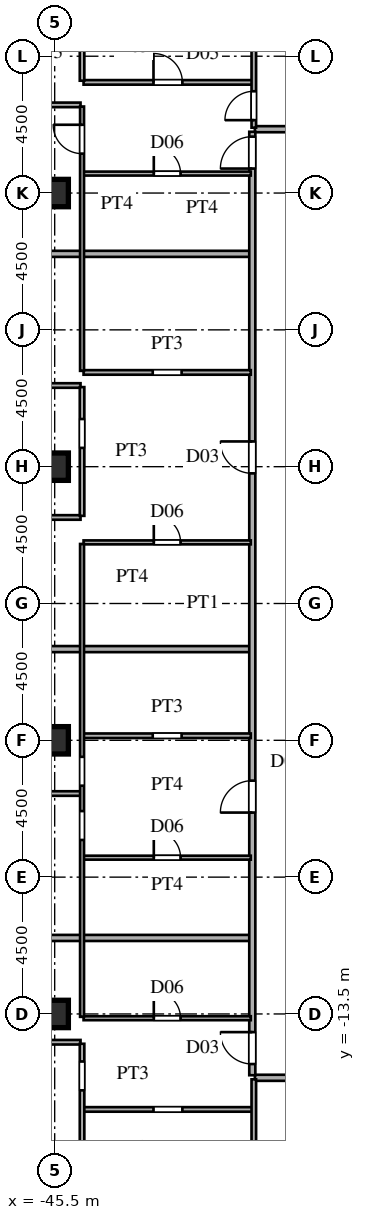
"""IFC4 building model, lengths in metres.
Left out: names, types, materials, properties, quantities, classifications, styles, units other than length and angle.
Written with IfcOpenShell. Run it as: python <this file> out.ifc"""

import sys

from ifc_helpers import new_model, si_unit, direction, frame, frame_2d, origin, origin_2d, place, context, subcontext, project, spatial, rectangle, i_section, extrude, source, transform, mapped, element, fill, save


model = new_model("IFC4")
c1 = context("Model", 3, precision=1e-05, world=origin(), true_north=direction((0.0, 1.0)))
c2 = subcontext(c1, "Body", "Model", "MODEL_VIEW")
j1 = project(units=[si_unit("LENGTHUNIT", "METRE"), si_unit("PLANEANGLEUNIT", "RADIAN")], contexts=[c1])
p1 = place(None, origin())
s1 = spatial("IfcSite", under=j1, at=p1, CompositionType="ELEMENT")
p2 = place(p1, origin())
s2 = spatial("IfcBuilding", under=s1, at=p2, CompositionType="ELEMENT")
p3 = place(p2, frame((0.0, 0.0, 40.5)))
s3 = spatial("IfcBuildingStorey", under=s2, at=p3, CompositionType="ELEMENT", Elevation=40.5)
m1 = source(origin(), c2, "Body", "SweptSolid", [
    extrude(i_section(OverallWidth=0.9, OverallDepth=0.9, WebThickness=0.036, FlangeThickness=0.055, at=origin_2d()), origin(), (0.0, 0.0, 1.0), 3.6),
])
for number, where, z_axis, x_axis in (
    (1, (-45.5, -13.5, 0.0), (0.0, 0.0, 1.0), (1.0, 0.0, 0.0)),
    (2, (-45.5, -4.5, 0.0), (0.0, 0.0, 1.0), (1.0, 0.0, 0.0)),
    (3, (-45.5, 4.5, 0.0), (0.0, 0.0, 1.0), (1.0, 0.0, 0.0)),
    (4, (-45.5, 13.5, 0.0), (0.0, 0.0, 1.0), (1.0, 0.0, 0.0)),
):
    element("IfcColumn", number, at=place(p3, frame(where, z_axis=z_axis, x_axis=x_axis)), inside=s3, PredefinedType="COLUMN", context=c2, shape_type="MappedRepresentation", body=[
        mapped(m1, transform((0.0, 0.0, 0.0), scale=1.0)),
    ])
p4 = place(p3, frame((-44.55, -16.64, 0.0), z_axis=(0.0, 0.0, 1.0), x_axis=(1.0, 0.0, 0.0)))
e5 = element("IfcWall", 5, at=p4, inside=s3, PredefinedType="PARTITIONING", context=c2, shape_type="SweptSolid", body=[
    extrude(rectangle(XDim=5.55, YDim=0.15, at=frame_2d((2.775, 0.0))), origin(), (0.0, 0.0, 1.0), 3.38),
])
p5 = place(p4, frame((2.3, 0.0, 0.0)))
e6 = element("IfcOpeningElement", 6, at=p5, cuts=e5, PredefinedType="OPENING", context=c2, shape_type="SweptSolid", body=[
    extrude(rectangle(XDim=0.95, YDim=2.15, at=frame_2d((0.475, 1.075))), frame((0.0, 0.085, 0.0), z_axis=(0.0, -1.0, 0.0), x_axis=(1.0, 0.0, 0.0)), (0.0, 0.0, 1.0), 0.17),
])
p6 = place(p3, frame((-38.915, -15.6, 0.0), z_axis=(0.0, 0.0, 1.0), x_axis=(1.0, 0.0, 0.0)))
e7 = element("IfcWall", 7, at=p6, inside=s3, PredefinedType="PARTITIONING", context=c2, shape_type="SweptSolid", body=[
    extrude(rectangle(XDim=2.33, YDim=0.2, at=frame_2d((1.165, 0.0))), origin(), (0.0, 0.0, 1.0), 3.38),
])
p7 = place(p3, frame((-61.588, -14.43, 0.0), z_axis=(0.0, 0.0, 1.0), x_axis=(1.0, 0.0, 0.0)))
e8 = element("IfcWall", 8, at=p7, inside=s3, PredefinedType="PARTITIONING", context=c2, shape_type="SweptSolid", body=[
    extrude(rectangle(XDim=16.938, YDim=0.15, at=frame_2d((8.469, 0.0))), origin(), (0.0, 0.0, 1.0), 3.38),
])
p8 = place(p7, frame((11.563, 0.0, 0.0)))
e9 = element("IfcOpeningElement", 9, at=p8, cuts=e8, PredefinedType="OPENING", context=c2, shape_type="SweptSolid", body=[
    extrude(rectangle(XDim=0.95, YDim=2.15, at=frame_2d((0.475, 1.075))), frame((0.0, 0.085, 0.0), z_axis=(0.0, -1.0, 0.0), x_axis=(1.0, 0.0, 0.0)), (0.0, 0.0, 1.0), 0.17),
])
p9 = place(p3, frame((-44.55, -13.64, 0.0), z_axis=(0.0, 0.0, 1.0), x_axis=(1.0, 0.0, 0.0)))
e10 = element("IfcWall", 10, at=p9, inside=s3, PredefinedType="PARTITIONING", context=c2, shape_type="SweptSolid", body=[
    extrude(rectangle(XDim=5.5, YDim=0.13, at=frame_2d((2.75, 0.0))), origin(), (0.0, 0.0, 1.0), 2.68),
])
p10 = place(p9, frame((2.31, 0.0, 0.0)))
e11 = element("IfcOpeningElement", 11, at=p10, cuts=e10, PredefinedType="OPENING", context=c2, shape_type="SweptSolid", body=[
    extrude(rectangle(XDim=0.88, YDim=2.1, at=frame_2d((0.44, 1.05))), frame((0.0, 0.075, 0.0), z_axis=(0.0, -1.0, 0.0), x_axis=(1.0, 0.0, 0.0)), (0.0, 0.0, 1.0), 0.15),
])
p11 = place(p3, frame((-70.043, -11.0, 0.0), z_axis=(0.0, 0.0, 1.0), x_axis=(1.0, 0.0, 0.0)))
e12 = element("IfcWall", 12, at=p11, inside=s3, PredefinedType="PARTITIONING", context=c2, shape_type="SweptSolid", body=[
    extrude(rectangle(XDim=30.963, YDim=0.2, at=frame_2d((15.481, 0.0))), origin(), (0.0, 0.0, 1.0), 3.38),
])
p12 = place(p3, frame((-44.55, -8.36, 0.0), z_axis=(0.0, 0.0, 1.0), x_axis=(1.0, 0.0, 0.0)))
e13 = element("IfcWall", 13, at=p12, inside=s3, PredefinedType="PARTITIONING", context=c2, shape_type="SweptSolid", body=[
    extrude(rectangle(XDim=5.5, YDim=0.13, at=frame_2d((2.75, 0.0))), origin(), (0.0, 0.0, 1.0), 3.38),
])
p13 = place(p12, frame((2.31, 0.0, 0.0)))
e14 = element("IfcOpeningElement", 14, at=p13, cuts=e13, PredefinedType="OPENING", context=c2, shape_type="SweptSolid", body=[
    extrude(rectangle(XDim=0.88, YDim=2.1, at=frame_2d((0.44, 1.05))), frame((0.0, 0.075, 0.0), z_axis=(0.0, -1.0, 0.0), x_axis=(1.0, 0.0, 0.0)), (0.0, 0.0, 1.0), 0.15),
])
p14 = place(p3, frame((-72.535, -6.25, 0.0), z_axis=(0.0, 0.0, 1.0), x_axis=(1.0, 0.0, 0.0)))
e15 = element("IfcWall", 15, at=p14, inside=s3, PredefinedType="PARTITIONING", context=c2, shape_type="SweptSolid", body=[
    extrude(rectangle(XDim=27.885, YDim=0.15, at=frame_2d((13.942, 0.0))), origin(), (0.0, 0.0, 1.0), 3.38),
])
p15 = place(p14, frame((14.71, 0.0, 0.0)))
e16 = element("IfcOpeningElement", 16, at=p15, cuts=e15, PredefinedType="OPENING", context=c2, shape_type="SweptSolid", body=[
    extrude(rectangle(XDim=0.95, YDim=2.15, at=frame_2d((0.475, 1.075))), frame((0.0, 0.085, 0.0), z_axis=(0.0, -1.0, 0.0), x_axis=(1.0, 0.0, 0.0)), (0.0, 0.0, 1.0), 0.17),
])
p16 = place(p3, frame((-44.55, -4.35, 0.0), z_axis=(0.0, 0.0, 1.0), x_axis=(1.0, 0.0, 0.0)))
e17 = element("IfcWall", 17, at=p16, inside=s3, PredefinedType="PARTITIONING", context=c2, shape_type="SweptSolid", body=[
    extrude(rectangle(XDim=5.5, YDim=0.15, at=frame_2d((2.75, 0.0))), origin(), (0.0, 0.0, 1.0), 2.68),
])
p17 = place(p16, frame((2.275, 0.0, 0.0)))
e18 = element("IfcOpeningElement", 18, at=p17, cuts=e17, PredefinedType="OPENING", context=c2, shape_type="SweptSolid", body=[
    extrude(rectangle(XDim=0.95, YDim=2.15, at=frame_2d((0.475, 1.075))), frame((0.0, 0.085, 0.0), z_axis=(0.0, -1.0, 0.0), x_axis=(1.0, 0.0, 0.0)), (0.0, 0.0, 1.0), 0.17),
])
p18 = place(p3, frame((-72.505, -1.5, 0.0), z_axis=(0.0, 0.0, 1.0), x_axis=(1.0, 0.0, 0.0)))
e19 = element("IfcWall", 19, at=p18, inside=s3, PredefinedType="PARTITIONING", context=c2, shape_type="SweptSolid", body=[
    extrude(rectangle(XDim=33.425, YDim=0.2, at=frame_2d((16.712, 0.0))), origin(), (0.0, 0.0, 1.0), 3.38),
])
p19 = place(p3, frame((-44.55, 2.01, 0.0), z_axis=(0.0, 0.0, 1.0), x_axis=(1.0, 0.0, 0.0)))
e20 = element("IfcWall", 20, at=p19, inside=s3, PredefinedType="PARTITIONING", context=c2, shape_type="SweptSolid", body=[
    extrude(rectangle(XDim=5.5, YDim=0.13, at=frame_2d((2.75, 0.0))), origin(), (0.0, 0.0, 1.0), 3.38),
])
p20 = place(p19, frame((2.31, 0.0, 0.0)))
e21 = element("IfcOpeningElement", 21, at=p20, cuts=e20, PredefinedType="OPENING", context=c2, shape_type="SweptSolid", body=[
    extrude(rectangle(XDim=0.88, YDim=2.1, at=frame_2d((0.44, 1.05))), frame((0.0, 0.075, 0.0), z_axis=(0.0, -1.0, 0.0), x_axis=(1.0, 0.0, 0.0)), (0.0, 0.0, 1.0), 0.15),
])
p21 = place(p3, frame((-72.535, 2.83, 0.0), z_axis=(0.0, 0.0, 1.0), x_axis=(1.0, 0.0, 0.0)))
e22 = element("IfcWall", 22, at=p21, inside=s3, PredefinedType="PARTITIONING", context=c2, shape_type="SweptSolid", body=[
    extrude(rectangle(XDim=27.885, YDim=0.15, at=frame_2d((13.942, 0.0))), origin(), (0.0, 0.0, 1.0), 3.38),
])
p22 = place(p21, frame((22.51, 0.0, 0.0)))
e23 = element("IfcOpeningElement", 23, at=p22, cuts=e22, PredefinedType="OPENING", context=c2, shape_type="SweptSolid", body=[
    extrude(rectangle(XDim=0.95, YDim=2.15, at=frame_2d((0.475, 1.075))), frame((0.0, 0.085, 0.0), z_axis=(0.0, -1.0, 0.0), x_axis=(1.0, 0.0, 0.0)), (0.0, 0.0, 1.0), 0.17),
])
p23 = place(p21, frame((14.71, 0.0, 0.0)))
e24 = element("IfcOpeningElement", 24, at=p23, cuts=e22, PredefinedType="OPENING", context=c2, shape_type="SweptSolid", body=[
    extrude(rectangle(XDim=0.95, YDim=2.15, at=frame_2d((0.475, 1.075))), frame((0.0, 0.085, 0.0), z_axis=(0.0, -1.0, 0.0), x_axis=(1.0, 0.0, 0.0)), (0.0, 0.0, 1.0), 0.17),
])
p24 = place(p3, frame((-72.535, 7.17, 0.0), z_axis=(0.0, 0.0, 1.0), x_axis=(1.0, 0.0, 0.0)))
e25 = element("IfcWall", 25, at=p24, inside=s3, PredefinedType="PARTITIONING", context=c2, shape_type="SweptSolid", body=[
    extrude(rectangle(XDim=27.885, YDim=0.15, at=frame_2d((13.942, 0.0))), origin(), (0.0, 0.0, 1.0), 3.38),
])
p25 = place(p24, frame((22.51, 0.0, 0.0)))
e26 = element("IfcOpeningElement", 26, at=p25, cuts=e25, PredefinedType="OPENING", context=c2, shape_type="SweptSolid", body=[
    extrude(rectangle(XDim=0.95, YDim=2.15, at=frame_2d((0.475, 1.075))), frame((0.0, 0.085, 0.0), z_axis=(0.0, -1.0, 0.0), x_axis=(1.0, 0.0, 0.0)), (0.0, 0.0, 1.0), 0.17),
])
p26 = place(p24, frame((14.71, 0.0, 0.0)))
e27 = element("IfcOpeningElement", 27, at=p26, cuts=e25, PredefinedType="OPENING", context=c2, shape_type="SweptSolid", body=[
    extrude(rectangle(XDim=0.95, YDim=2.15, at=frame_2d((0.475, 1.075))), frame((0.0, 0.085, 0.0), z_axis=(0.0, -1.0, 0.0), x_axis=(1.0, 0.0, 0.0)), (0.0, 0.0, 1.0), 0.17),
])
p27 = place(p3, frame((-44.55, 7.6, 0.0), z_axis=(0.0, 0.0, 1.0), x_axis=(1.0, 0.0, 0.0)))
e28 = element("IfcWall", 28, at=p27, inside=s3, PredefinedType="PARTITIONING", context=c2, shape_type="SweptSolid", body=[
    extrude(rectangle(XDim=5.5, YDim=0.15, at=frame_2d((2.75, 0.0))), origin(), (0.0, 0.0, 1.0), 3.38),
])
p28 = place(p27, frame((2.275, 0.0, 0.0)))
e29 = element("IfcOpeningElement", 29, at=p28, cuts=e28, PredefinedType="OPENING", context=c2, shape_type="SweptSolid", body=[
    extrude(rectangle(XDim=0.95, YDim=2.15, at=frame_2d((0.475, 1.075))), frame((0.0, 0.085, 0.0), z_axis=(0.0, -1.0, 0.0), x_axis=(1.0, 0.0, 0.0)), (0.0, 0.0, 1.0), 0.17),
])
p29 = place(p3, frame((-68.807, 11.5, 0.0), z_axis=(0.0, 0.0, 1.0), x_axis=(1.0, 0.0, 0.0)))
e30 = element("IfcWall", 30, at=p29, inside=s3, PredefinedType="PARTITIONING", context=c2, shape_type="SweptSolid", body=[
    extrude(rectangle(XDim=29.727, YDim=0.2, at=frame_2d((14.863, 0.0))), origin(), (0.0, 0.0, 1.0), 3.38),
])
p30 = place(p3, frame((-44.55, 14.14, 0.0), z_axis=(0.0, 0.0, 1.0), x_axis=(1.0, 0.0, 0.0)))
e31 = element("IfcWall", 31, at=p30, inside=s3, PredefinedType="PARTITIONING", context=c2, shape_type="SweptSolid", body=[
    extrude(rectangle(XDim=5.5, YDim=0.13, at=frame_2d((2.75, 0.0))), origin(), (0.0, 0.0, 1.0), 3.38),
])
p31 = place(p30, frame((2.31, 0.0, 0.0)))
e32 = element("IfcOpeningElement", 32, at=p31, cuts=e31, PredefinedType="OPENING", context=c2, shape_type="SweptSolid", body=[
    extrude(rectangle(XDim=0.88, YDim=2.1, at=frame_2d((0.44, 1.05))), frame((0.0, 0.075, 0.0), z_axis=(0.0, -1.0, 0.0), x_axis=(1.0, 0.0, 0.0)), (0.0, 0.0, 1.0), 0.15),
])
p32 = place(p3, frame((-38.915, 15.6, 0.0), z_axis=(0.0, 0.0, 1.0), x_axis=(1.0, 0.0, 0.0)))
e33 = element("IfcWall", 33, at=p32, inside=s3, PredefinedType="PARTITIONING", context=c2, shape_type="SweptSolid", body=[
    extrude(rectangle(XDim=2.33, YDim=0.2, at=frame_2d((1.165, 0.0))), origin(), (0.0, 0.0, 1.0), 3.38),
])
p33 = place(p3, frame((-54.45, 16.4, 0.0), z_axis=(0.0, 0.0, 1.0), x_axis=(1.0, 0.0, 0.0)))
e34 = element("IfcWall", 34, at=p33, inside=s3, PredefinedType="PARTITIONING", context=c2, shape_type="SweptSolid", body=[
    extrude(rectangle(XDim=9.8, YDim=0.15, at=frame_2d((4.9, 0.0))), origin(), (0.0, 0.0, 1.0), 3.38),
])
p34 = place(p33, frame((4.425, 0.0, 0.0)))
e35 = element("IfcOpeningElement", 35, at=p34, cuts=e34, PredefinedType="OPENING", context=c2, shape_type="SweptSolid", body=[
    extrude(rectangle(XDim=0.95, YDim=2.15, at=frame_2d((0.475, 1.075))), frame((0.0, 0.085, 0.0), z_axis=(0.0, -1.0, 0.0), x_axis=(1.0, 0.0, 0.0)), (0.0, 0.0, 1.0), 0.17),
])
p35 = place(p3, frame((-44.55, 17.14, 0.0), z_axis=(0.0, 0.0, 1.0), x_axis=(1.0, 0.0, 0.0)))
e36 = element("IfcWall", 36, at=p35, inside=s3, PredefinedType="PARTITIONING", context=c2, shape_type="SweptSolid", body=[
    extrude(rectangle(XDim=5.55, YDim=0.15, at=frame_2d((2.775, 0.0))), origin(), (0.0, 0.0, 1.0), 3.38),
])
p36 = place(p35, frame((2.3, 0.0, 0.0)))
e37 = element("IfcOpeningElement", 37, at=p36, cuts=e36, PredefinedType="OPENING", context=c2, shape_type="SweptSolid", body=[
    extrude(rectangle(XDim=0.95, YDim=2.15, at=frame_2d((0.475, 1.075))), frame((0.0, 0.085, 0.0), z_axis=(0.0, -1.0, 0.0), x_axis=(1.0, 0.0, 0.0)), (0.0, 0.0, 1.0), 0.17),
])
p37 = place(p3, frame((-44.6, -21.328, 0.0), z_axis=(0.0, 0.0, 1.0), x_axis=(0.0, 1.0, 0.0)))
e38 = element("IfcWall", 38, at=p37, inside=s3, PredefinedType="PARTITIONING", context=c2, shape_type="SweptSolid", body=[
    extrude(rectangle(XDim=6.847, YDim=0.15, at=frame_2d((3.423, 0.0))), origin(), (0.0, 0.0, 1.0), 3.38),
])
p38 = place(p37, frame((5.315, 0.0, 0.0)))
e39 = element("IfcOpeningElement", 39, at=p38, cuts=e38, PredefinedType="OPENING", context=c2, shape_type="SweptSolid", body=[
    extrude(rectangle(XDim=0.95, YDim=2.15, at=frame_2d((0.475, 1.075))), frame((0.0, 0.085, 0.0), z_axis=(0.0, -1.0, 0.0), x_axis=(1.0, 0.0, 0.0)), (0.0, 0.0, 1.0), 0.17),
])
p39 = place(p3, frame((-44.6, -13.595, 0.0), z_axis=(0.0, 0.0, 1.0), x_axis=(0.0, 1.0, 0.0)))
e40 = element("IfcWall", 40, at=p39, inside=s3, PredefinedType="PARTITIONING", context=c2, shape_type="SweptSolid", body=[
    extrude(rectangle(XDim=15.553, YDim=0.13, at=frame_2d((7.776, 0.0))), origin(), (0.0, 0.0, 1.0), 3.38),
])
p40 = place(p39, frame((5.817, 0.0, 0.0)))
e41 = element("IfcOpeningElement", 41, at=p40, cuts=e40, PredefinedType="OPENING", context=c2, shape_type="SweptSolid", body=[
    extrude(rectangle(XDim=0.95, YDim=2.15, at=frame_2d((0.475, 1.075))), frame((0.0, 0.075, 0.0), z_axis=(0.0, -1.0, 0.0), x_axis=(1.0, 0.0, 0.0)), (0.0, 0.0, 1.0), 0.15),
])
p41 = place(p39, frame((7.602, 0.0, 0.0)))
e42 = element("IfcOpeningElement", 42, at=p41, cuts=e40, PredefinedType="OPENING", context=c2, shape_type="SweptSolid", body=[
    extrude(rectangle(XDim=0.95, YDim=2.15, at=frame_2d((0.475, 1.075))), frame((0.0, 0.075, 0.0), z_axis=(0.0, -1.0, 0.0), x_axis=(1.0, 0.0, 0.0)), (0.0, 0.0, 1.0), 0.15),
])
p42 = place(p3, frame((-44.6, 2.883, 0.0), z_axis=(0.0, 0.0, 1.0), x_axis=(0.0, 1.0, 0.0)))
e43 = element("IfcWall", 43, at=p42, inside=s3, PredefinedType="PARTITIONING", context=c2, shape_type="SweptSolid", body=[
    extrude(rectangle(XDim=4.234, YDim=0.15, at=frame_2d((2.117, 0.0))), origin(), (0.0, 0.0, 1.0), 3.38),
])
p43 = place(p42, frame((2.235, 0.0, 0.0)))
e44 = element("IfcOpeningElement", 44, at=p43, cuts=e43, PredefinedType="OPENING", context=c2, shape_type="SweptSolid", body=[
    extrude(rectangle(XDim=0.95, YDim=2.15, at=frame_2d((0.475, 1.075))), frame((0.0, 0.085, 0.0), z_axis=(0.0, -1.0, 0.0), x_axis=(1.0, 0.0, 0.0)), (0.0, 0.0, 1.0), 0.17),
])
p44 = place(p3, frame((-44.6, 7.652, 0.0), z_axis=(0.0, 0.0, 1.0), x_axis=(0.0, 1.0, 0.0)))
e45 = element("IfcWall", 45, at=p44, inside=s3, PredefinedType="PARTITIONING", context=c2, shape_type="SweptSolid", body=[
    extrude(rectangle(XDim=8.694, YDim=0.13, at=frame_2d((4.347, 0.0))), origin(), (0.0, 0.0, 1.0), 3.38),
])
p45 = place(p44, frame((7.144, 0.0, 0.0)))
e46 = element("IfcOpeningElement", 46, at=p45, cuts=e45, PredefinedType="OPENING", context=c2, shape_type="SweptSolid", body=[
    extrude(rectangle(XDim=0.95, YDim=2.15, at=frame_2d((0.475, 1.075))), frame((0.0, 0.075, 0.0), z_axis=(0.0, -1.0, 0.0), x_axis=(1.0, 0.0, 0.0)), (0.0, 0.0, 1.0), 0.15),
])
p46 = place(p3, frame((-44.6, 17.195, 0.0), z_axis=(0.0, 0.0, 1.0), x_axis=(0.0, 1.0, 0.0)))
e47 = element("IfcWall", 47, at=p46, inside=s3, PredefinedType="PARTITIONING", context=c2, shape_type="SweptSolid", body=[
    extrude(rectangle(XDim=4.133, YDim=0.15, at=frame_2d((2.066, 0.0))), origin(), (0.0, 0.0, 1.0), 3.38),
])
p47 = place(p3, frame((-39.0, -15.515, 0.0), z_axis=(0.0, 0.0, 1.0), x_axis=(0.0, 1.0, 0.0)))
e48 = element("IfcWall", 48, at=p47, inside=s3, PredefinedType="PARTITIONING", context=c2, shape_type="SweptSolid", body=[
    extrude(rectangle(XDim=31.03, YDim=0.2, at=frame_2d((15.515, 0.0))), origin(), (0.0, 0.0, 1.0), 3.38),
])
p48 = place(p47, frame((0.367, 0.0, 0.0)))
e49 = element("IfcOpeningElement", 49, at=p48, cuts=e48, PredefinedType="OPENING", context=c2, shape_type="SweptSolid", body=[
    extrude(rectangle(XDim=1.05, YDim=2.25, at=frame_2d((0.525, 1.125))), frame((0.0, 0.11, 0.0), z_axis=(0.0, -1.0, 0.0), x_axis=(1.0, 0.0, 0.0)), (0.0, 0.0, 1.0), 0.22),
])
p49 = place(p47, frame((8.638, 0.0, 0.0)))
e50 = element("IfcOpeningElement", 50, at=p49, cuts=e48, PredefinedType="OPENING", context=c2, shape_type="SweptSolid", body=[
    extrude(rectangle(XDim=1.05, YDim=2.25, at=frame_2d((0.525, 1.125))), frame((0.0, 0.11, 0.0), z_axis=(0.0, -1.0, 0.0), x_axis=(1.0, 0.0, 0.0)), (0.0, 0.0, 1.0), 0.22),
])
p50 = place(p47, frame((19.795, 0.0, 0.0)))
e51 = element("IfcOpeningElement", 51, at=p50, cuts=e48, PredefinedType="OPENING", context=c2, shape_type="SweptSolid", body=[
    extrude(rectangle(XDim=1.05, YDim=2.25, at=frame_2d((0.525, 1.125))), frame((0.0, 0.11, 0.0), z_axis=(0.0, -1.0, 0.0), x_axis=(1.0, 0.0, 0.0)), (0.0, 0.0, 1.0), 0.22),
])
p51 = place(p47, frame((29.82, 0.0, 0.0)))
e52 = element("IfcOpeningElement", 52, at=p51, cuts=e48, PredefinedType="OPENING", context=c2, shape_type="SweptSolid", body=[
    extrude(rectangle(XDim=1.05, YDim=2.25, at=frame_2d((0.525, 1.125))), frame((0.0, 0.11, 0.0), z_axis=(0.0, -1.0, 0.0), x_axis=(1.0, 0.0, 0.0)), (0.0, 0.0, 1.0), 0.22),
])
p52 = place(p3, frame((-38.95, -23.615, 0.0), z_axis=(0.0, 0.0, 1.0), x_axis=(0.0, 1.0, 0.0)))
e53 = element("IfcWall", 53, at=p52, inside=s3, PredefinedType="PARTITIONING", context=c2, shape_type="SweptSolid", body=[
    extrude(rectangle(XDim=7.965, YDim=0.15, at=frame_2d((3.982, 0.0))), origin(), (0.0, 0.0, 1.0), 3.38),
])
p53 = place(p52, frame((1.225, 0.0, 0.0)))
e54 = element("IfcOpeningElement", 54, at=p53, cuts=e53, PredefinedType="OPENING", context=c2, shape_type="SweptSolid", body=[
    extrude(rectangle(XDim=0.95, YDim=2.15, at=frame_2d((0.475, 1.075))), frame((0.0, 0.085, 0.0), z_axis=(0.0, -1.0, 0.0), x_axis=(1.0, 0.0, 0.0)), (0.0, 0.0, 1.0), 0.17),
])
p54 = place(p3, frame((-38.95, 15.65, 0.0), z_axis=(0.0, 0.0, 1.0), x_axis=(0.0, 1.0, 0.0)))
e55 = element("IfcWall", 55, at=p54, inside=s3, PredefinedType="PARTITIONING", context=c2, shape_type="SweptSolid", body=[
    extrude(rectangle(XDim=7.965, YDim=0.15, at=frame_2d((3.982, 0.0))), origin(), (0.0, 0.0, 1.0), 3.38),
])
p55 = place(p54, frame((0.248, 0.0, 0.0)))
e56 = element("IfcOpeningElement", 56, at=p55, cuts=e55, PredefinedType="OPENING", context=c2, shape_type="SweptSolid", body=[
    extrude(rectangle(XDim=0.95, YDim=2.15, at=frame_2d((0.475, 1.075))), frame((0.0, 0.085, 0.0), z_axis=(0.0, -1.0, 0.0), x_axis=(1.0, 0.0, 0.0)), (0.0, 0.0, 1.0), 0.17),
])
m2 = source(origin(), c2, "Body", "SweptSolid", [
    extrude(rectangle(XDim=0.88, YDim=2.1, at=frame_2d((0.44, 1.05))), frame((0.0, 0.025, 0.0), z_axis=(0.0, -1.0, 0.0), x_axis=(1.0, 0.0, 0.0)), (0.0, 0.0, 1.0), 0.05),
])
p56 = place(p10, origin())
e57 = element("IfcDoor", 57, at=p56, inside=s3, OperationType="SINGLE_SWING_LEFT", PredefinedType="DOOR", context=c2, shape_type="MappedRepresentation", body=[
    mapped(m2, transform((0.0, 0.0, 0.0), scale=1.0)),
])
fill(e11, e57)
p57 = place(p13, origin())
e58 = element("IfcDoor", 58, at=p57, inside=s3, OperationType="SINGLE_SWING_LEFT", PredefinedType="DOOR", context=c2, shape_type="MappedRepresentation", body=[
    mapped(m2, transform((0.0, 0.0, 0.0), scale=1.0)),
])
fill(e14, e58)
p58 = place(p20, origin())
e59 = element("IfcDoor", 59, at=p58, inside=s3, OperationType="SINGLE_SWING_LEFT", PredefinedType="DOOR", context=c2, shape_type="MappedRepresentation", body=[
    mapped(m2, transform((0.0, 0.0, 0.0), scale=1.0)),
])
fill(e21, e59)
p59 = place(p31, origin())
e60 = element("IfcDoor", 60, at=p59, inside=s3, OperationType="SINGLE_SWING_LEFT", PredefinedType="DOOR", context=c2, shape_type="MappedRepresentation", body=[
    mapped(m2, transform((0.0, 0.0, 0.0), scale=1.0)),
])
fill(e32, e60)
m3 = source(origin(), c2, "Body", "SweptSolid", [
    extrude(rectangle(XDim=0.95, YDim=2.15, at=frame_2d((0.475, 1.075))), frame((0.0, 0.025, 0.0), z_axis=(0.0, -1.0, 0.0), x_axis=(1.0, 0.0, 0.0)), (0.0, 0.0, 1.0), 0.05),
])
p60 = place(p36, origin())
e61 = element("IfcDoor", 61, at=p60, inside=s3, OperationType="SINGLE_SWING_LEFT", PredefinedType="DOOR", context=c2, shape_type="MappedRepresentation", body=[
    mapped(m3, transform((0.0, 0.0, 0.0), scale=1.0)),
])
fill(e37, e61)
p61 = place(p45, origin())
e62 = element("IfcDoor", 62, at=p61, inside=s3, OperationType="SINGLE_SWING_RIGHT", PredefinedType="DOOR", context=c2, shape_type="MappedRepresentation", body=[
    mapped(m3, transform((0.0, 0.0, 0.0), scale=1.0)),
])
fill(e46, e62)
m4 = source(origin(), c2, "Body", "SweptSolid", [
    extrude(rectangle(XDim=1.05, YDim=2.25, at=frame_2d((0.525, 1.125))), frame((0.0, 0.025, 0.0), z_axis=(0.0, -1.0, 0.0), x_axis=(1.0, 0.0, 0.0)), (0.0, 0.0, 1.0), 0.05),
])
p62 = place(p48, origin())
e63 = element("IfcDoor", 63, at=p62, inside=s3, OperationType="SINGLE_SWING_RIGHT", PredefinedType="DOOR", context=c2, shape_type="MappedRepresentation", body=[
    mapped(m4, transform((0.0, 0.0, 0.0), scale=1.0)),
])
fill(e49, e63)
p63 = place(p49, origin())
e64 = element("IfcDoor", 64, at=p63, inside=s3, OperationType="SINGLE_SWING_LEFT", PredefinedType="DOOR", context=c2, shape_type="MappedRepresentation", body=[
    mapped(m4, transform((0.0, 0.0, 0.0), scale=1.0)),
])
fill(e50, e64)
p64 = place(p50, origin())
e65 = element("IfcDoor", 65, at=p64, inside=s3, OperationType="SINGLE_SWING_RIGHT", PredefinedType="DOOR", context=c2, shape_type="MappedRepresentation", body=[
    mapped(m4, transform((0.0, 0.0, 0.0), scale=1.0)),
])
fill(e51, e65)
p65 = place(p51, origin())
e66 = element("IfcDoor", 66, at=p65, inside=s3, OperationType="SINGLE_SWING_LEFT", PredefinedType="DOOR", context=c2, shape_type="MappedRepresentation", body=[
    mapped(m4, transform((0.0, 0.0, 0.0), scale=1.0)),
])
fill(e52, e66)
p66 = place(p55, origin())
e67 = element("IfcDoor", 67, at=p66, inside=s3, OperationType="SINGLE_SWING_LEFT", PredefinedType="DOOR", context=c2, shape_type="MappedRepresentation", body=[
    mapped(m3, transform((0.0, 0.0, 0.0), scale=1.0)),
])
fill(e56, e67)
save(model, sys.argv[1])
